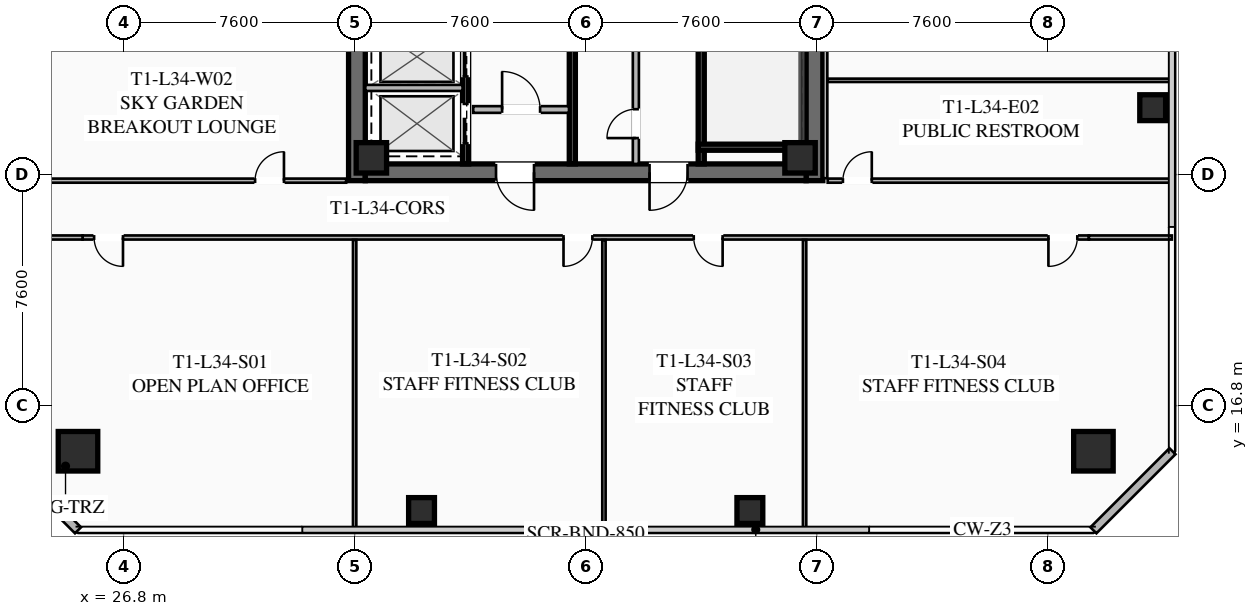
"""IFC4 building model, lengths in metres.
Left out: names, types, materials, properties, quantities, classifications, styles, units other than length and angle.
Written with IfcOpenShell. Run it as: python <this file> out.ifc"""

import sys

from ifc_helpers import new_model, si_unit, direction, frame, frame_2d, origin, origin_2d, place, context, subcontext, project, spatial, rectangle, hollow_rectangle, extrude, element, fill, save


model = new_model("IFC4")
c1 = context("Model", 3, precision=1e-05, world=origin(), true_north=direction((0.0, 1.0)))
c2 = subcontext(c1, "Body", "Model", "MODEL_VIEW")
j1 = project(units=[si_unit("LENGTHUNIT", "METRE"), si_unit("PLANEANGLEUNIT", "RADIAN")], contexts=[c1])
p1 = place(None, origin())
s1 = spatial("IfcSite", under=j1, at=p1, CompositionType="ELEMENT")
p2 = place(p1, origin())
s2 = spatial("IfcBuilding", under=s1, at=p2, CompositionType="ELEMENT")
p3 = place(p2, frame((0.0, 0.0, 128.6)))
s3 = spatial("IfcBuildingStorey", under=s2, at=p3, CompositionType="ELEMENT", Elevation=128.6)
for number, where, z_axis, x_axis in (
    (1, (34.475, 24.2, 0.0), (0.0, 0.0, 1.0), (0.0, 1.0, 0.0)),
    (2, (49.525, 39.8, 0.0), (0.0, 0.0, 1.0), (0.0, -1.0, 0.0)),
):
    element("IfcWall", number, at=place(p3, frame(where, z_axis=z_axis, x_axis=x_axis)), inside=s3, PredefinedType="SHEAR", context=c2, shape_type="SweptSolid", body=[
        extrude(rectangle(XDim=15.6, YDim=0.55, at=frame_2d((7.8, 0.0))), origin(), (0.0, 0.0, 1.0), 3.55),
    ])
p4 = place(p3, frame((49.25, 24.475, 0.0), z_axis=(0.0, 0.0, 1.0), x_axis=(-1.0, 0.0, 0.0)))
e3 = element("IfcWall", 3, at=p4, inside=s3, PredefinedType="SHEAR", context=c2, shape_type="SweptSolid", body=[
    extrude(rectangle(XDim=14.5, YDim=0.55, at=frame_2d((7.25, 0.0))), origin(), (0.0, 0.0, 1.0), 3.55),
])
p5 = place(p4, frame((8.95, 0.0, 0.0)))
e4 = element("IfcOpeningElement", 4, at=p5, cuts=e3, PredefinedType="OPENING", context=c2, shape_type="SweptSolid", body=[
    extrude(rectangle(XDim=1.25, YDim=2.25, at=frame_2d((0.625, 1.125))), frame((0.0, 0.285, 0.0), z_axis=(0.0, -1.0, 0.0), x_axis=(1.0, 0.0, 0.0)), (0.0, 0.0, 1.0), 0.57),
])
p6 = place(p4, frame((3.9, 0.0, 0.0)))
e5 = element("IfcOpeningElement", 5, at=p6, cuts=e3, PredefinedType="OPENING", context=c2, shape_type="SweptSolid", body=[
    extrude(rectangle(XDim=1.25, YDim=2.25, at=frame_2d((0.625, 1.125))), frame((0.0, 0.285, 0.0), z_axis=(0.0, -1.0, 0.0), x_axis=(1.0, 0.0, 0.0)), (0.0, 0.0, 1.0), 0.57),
])
for number, where, z_axis, x_axis in (
    (6, (34.95, 24.95, 0.0), (0.0, 0.0, 1.0), (1.0, 0.0, 0.0)),
    (7, (49.05, 24.95, 0.0), (0.0, 0.0, 1.0), (1.0, 0.0, 0.0)),
):
    element("IfcColumn", number, at=place(p3, frame(where, z_axis=z_axis, x_axis=x_axis)), inside=s3, PredefinedType="COLUMN", context=c2, shape_type="SweptSolid", body=[
        extrude(hollow_rectangle(XDim=1.0, YDim=1.0, WallThickness=0.04, at=origin_2d()), origin(), (0.0, 0.0, 1.0), 3.37),
    ])
for number, where, z_axis, x_axis in (
    (8, (25.3, 15.3, 0.0), (0.0, 0.0, 1.0), (1.0, 0.0, 0.0)),
    (9, (58.7, 15.3, 0.0), (0.0, 0.0, 1.0), (1.0, 0.0, 0.0)),
):
    element("IfcColumn", number, at=place(p3, frame(where, z_axis=z_axis, x_axis=x_axis)), inside=s3, PredefinedType="COLUMN", context=c2, shape_type="SweptSolid", body=[
        extrude(hollow_rectangle(XDim=1.3, YDim=1.3, WallThickness=0.05, at=origin_2d()), origin(), (0.0, 0.0, 1.0), 3.37),
    ])
for number, where, z_axis, x_axis in (
    (10, (36.6, 13.35, 0.0), (0.0, 0.0, 1.0), (1.0, 0.0, 0.0)),
    (11, (47.4, 13.35, 0.0), (0.0, 0.0, 1.0), (1.0, 0.0, 0.0)),
    (12, (60.65, 26.6, 0.0), (0.0, 0.0, 1.0), (1.0, 0.0, 0.0)),
):
    element("IfcColumn", number, at=place(p3, frame(where, z_axis=z_axis, x_axis=x_axis)), inside=s3, PredefinedType="COLUMN", context=c2, shape_type="SweptSolid", body=[
        extrude(hollow_rectangle(XDim=0.85, YDim=0.85, WallThickness=0.035, at=origin_2d()), origin(), (0.0, 0.0, 1.0), 3.37),
    ])
for number, where, z_axis, x_axis in (
    (13, (25.3, 12.7, 0.0), (0.0, 0.0, 1.0), (-0.707, 0.707, 0.0)),
    (14, (61.3, 15.3, 0.0), (0.0, 0.0, 1.0), (-0.707, -0.707, 0.0)),
):
    element("IfcWall", number, at=place(p3, frame(where, z_axis=z_axis, x_axis=x_axis)), inside=s3, PredefinedType="SOLIDWALL", context=c2, shape_type="SweptSolid", body=[
        extrude(rectangle(XDim=3.677, YDim=0.28, at=frame_2d((1.838, 0.0))), origin(), (0.0, 0.0, 1.0), 3.37),
    ])
p7 = place(p3, frame((45.8, 32.8, 0.0), z_axis=(0.0, 0.0, 1.0), x_axis=(0.0, -1.0, 0.0)))
e15 = element("IfcWall", 15, at=p7, inside=s3, PredefinedType="SHEAR", context=c2, shape_type="SweptSolid", body=[
    extrude(rectangle(XDim=8.05, YDim=0.2, at=frame_2d((4.025, 0.0))), origin(), (0.0, 0.0, 1.0), 3.37),
])
p8 = place(p7, frame((0.45, 0.0, 0.0)))
e16 = element("IfcOpeningElement", 16, at=p8, cuts=e15, PredefinedType="OPENING", context=c2, shape_type="SweptSolid", body=[
    extrude(rectangle(XDim=1.15, YDim=2.2, at=frame_2d((0.575, 1.1))), frame((0.0, 0.11, 0.0), z_axis=(0.0, -1.0, 0.0), x_axis=(1.0, 0.0, 0.0)), (0.0, 0.0, 1.0), 0.22),
])
p9 = place(p3, frame((45.7, 25.3, 0.0), z_axis=(0.0, 0.0, 1.0), x_axis=(1.0, 0.0, 0.0)))
e17 = element("IfcWall", 17, at=p9, inside=s3, PredefinedType="SHEAR", context=c2, shape_type="SweptSolid", body=[
    extrude(rectangle(XDim=3.55, YDim=0.2, at=frame_2d((1.775, 0.0))), origin(), (0.0, 0.0, 1.0), 3.37),
])
p10 = place(p3, frame((41.56, 24.75, 0.0), z_axis=(0.0, 0.0, 1.0), x_axis=(0.0, 1.0, 0.0)))
e18 = element("IfcWall", 18, at=p10, inside=s3, PredefinedType="SHEAR", context=c2, shape_type="SweptSolid", body=[
    extrude(rectangle(XDim=14.5, YDim=0.2, at=frame_2d((7.25, 0.0))), origin(), (0.0, 0.0, 1.0), 3.37),
])
p11 = place(p3, frame((38.3, 26.54, 0.0), z_axis=(0.0, 0.0, 1.0), x_axis=(1.0, 0.0, 0.0)))
e19 = element("IfcWall", 19, at=p11, inside=s3, PredefinedType="SOLIDWALL", context=c2, shape_type="SweptSolid", body=[
    extrude(rectangle(XDim=3.15, YDim=0.22, at=frame_2d((1.575, 0.0))), origin(), (0.0, 0.0, 1.0), 2.723),
])
p12 = place(p11, frame((0.95, 0.0, 0.0)))
e20 = element("IfcOpeningElement", 20, at=p12, cuts=e19, PredefinedType="OPENING", context=c2, shape_type="SweptSolid", body=[
    extrude(rectangle(XDim=1.25, YDim=2.25, at=frame_2d((0.625, 1.125))), frame((0.0, 0.12, 0.0), z_axis=(0.0, -1.0, 0.0), x_axis=(1.0, 0.0, 0.0)), (0.0, 0.0, 1.0), 0.24),
])
p13 = place(p3, frame((38.05, 24.75, 0.0), z_axis=(0.0, 0.0, 1.0), x_axis=(0.0, 1.0, 0.0)))
e21 = element("IfcWall", 21, at=p13, inside=s3, PredefinedType="SHEAR", context=c2, shape_type="SweptSolid", body=[
    extrude(rectangle(XDim=6.45, YDim=0.2, at=frame_2d((3.225, 0.0))), origin(), (0.0, 0.0, 1.0), 3.37),
])
p14 = place(p13, frame((4.875, 0.0, 0.0)))
e22 = element("IfcOpeningElement", 22, at=p14, cuts=e21, PredefinedType="OPENING", context=c2, shape_type="SweptSolid", body=[
    extrude(rectangle(XDim=1.3, YDim=2.25, at=frame_2d((0.65, 1.125))), frame((0.0, 0.11, 0.0), z_axis=(0.0, -1.0, 0.0), x_axis=(1.0, 0.0, 0.0)), (0.0, 0.0, 1.0), 0.22),
])
p15 = place(p13, frame((2.875, 0.0, 0.0)))
e23 = element("IfcOpeningElement", 23, at=p15, cuts=e21, PredefinedType="OPENING", context=c2, shape_type="SweptSolid", body=[
    extrude(rectangle(XDim=1.3, YDim=2.25, at=frame_2d((0.65, 1.125))), frame((0.0, 0.11, 0.0), z_axis=(0.0, -1.0, 0.0), x_axis=(1.0, 0.0, 0.0)), (0.0, 0.0, 1.0), 0.22),
])
p16 = place(p13, frame((0.675, 0.0, 0.0)))
e24 = element("IfcOpeningElement", 24, at=p16, cuts=e21, PredefinedType="OPENING", context=c2, shape_type="SweptSolid", body=[
    extrude(rectangle(XDim=1.3, YDim=2.25, at=frame_2d((0.65, 1.125))), frame((0.0, 0.11, 0.0), z_axis=(0.0, -1.0, 0.0), x_axis=(1.0, 0.0, 0.0)), (0.0, 0.0, 1.0), 0.22),
])
p17 = place(p3, frame((34.75, 27.25, 0.0), z_axis=(0.0, 0.0, 1.0), x_axis=(1.0, 0.0, 0.0)))
e25 = element("IfcWall", 25, at=p17, inside=s3, PredefinedType="SOLIDWALL", context=c2, shape_type="SweptSolid", body=[
    extrude(rectangle(XDim=3.2, YDim=0.2, at=frame_2d((1.6, 0.0))), origin(), (0.0, 0.0, 1.0), 3.37),
])
p18 = place(p3, frame((43.65, 24.75, 0.0), z_axis=(0.0, 0.0, 1.0), x_axis=(0.0, 1.0, 0.0)))
e26 = element("IfcWall", 26, at=p18, inside=s3, PredefinedType="SOLIDWALL", context=c2, shape_type="SweptSolid", body=[
    extrude(rectangle(XDim=6.9, YDim=0.2, at=frame_2d((3.45, 0.0))), origin(), (0.0, 0.0, 1.0), 2.723),
])
p19 = place(p18, frame((0.85, 0.0, 0.0)))
e27 = element("IfcOpeningElement", 27, at=p19, cuts=e26, PredefinedType="OPENING", context=c2, shape_type="SweptSolid", body=[
    extrude(rectangle(XDim=0.95, YDim=2.05, at=frame_2d((0.475, 1.025))), frame((0.0, 0.11, 0.0), z_axis=(0.0, -1.0, 0.0), x_axis=(1.0, 0.0, 0.0)), (0.0, 0.0, 1.0), 0.22),
])
p20 = place(p18, frame((4.8, 0.0, 0.0)))
e28 = element("IfcOpeningElement", 28, at=p20, cuts=e26, PredefinedType="OPENING", context=c2, shape_type="SweptSolid", body=[
    extrude(rectangle(XDim=1.05, YDim=2.2, at=frame_2d((0.525, 1.1))), frame((0.0, 0.11, 0.0), z_axis=(0.0, -1.0, 0.0), x_axis=(1.0, 0.0, 0.0)), (0.0, 0.0, 1.0), 0.22),
])
p21 = place(p3, frame((58.55, 22.33, 0.0), z_axis=(0.0, 0.0, 1.0), x_axis=(-1.0, 0.0, 0.0)))
e29 = element("IfcWall", 29, at=p21, inside=s3, PredefinedType="PARTITIONING", context=c2, shape_type="SweptSolid", body=[
    extrude(rectangle(XDim=33.1, YDim=0.135, at=frame_2d((16.55, 0.0))), origin(), (0.0, 0.0, 1.0), 2.723),
])
p22 = place(p21, frame((31.77, 0.0, 0.0)))
e30 = element("IfcOpeningElement", 30, at=p22, cuts=e29, PredefinedType="OPENING", context=c2, shape_type="SweptSolid", body=[
    extrude(rectangle(XDim=0.95, YDim=2.05, at=frame_2d((0.475, 1.025))), frame((0.0, 0.077, 0.0), z_axis=(0.0, -1.0, 0.0), x_axis=(1.0, 0.0, 0.0)), (0.0, 0.0, 1.0), 0.155),
])
p23 = place(p21, frame((16.33, 0.0, 0.0)))
e31 = element("IfcOpeningElement", 31, at=p23, cuts=e29, PredefinedType="OPENING", context=c2, shape_type="SweptSolid", body=[
    extrude(rectangle(XDim=0.95, YDim=2.05, at=frame_2d((0.475, 1.025))), frame((0.0, 0.077, 0.0), z_axis=(0.0, -1.0, 0.0), x_axis=(1.0, 0.0, 0.0)), (0.0, 0.0, 1.0), 0.155),
])
p24 = place(p21, frame((12.046, 0.0, 0.0)))
e32 = element("IfcOpeningElement", 32, at=p24, cuts=e29, PredefinedType="OPENING", context=c2, shape_type="SweptSolid", body=[
    extrude(rectangle(XDim=0.95, YDim=2.05, at=frame_2d((0.475, 1.025))), frame((0.0, 0.077, 0.0), z_axis=(0.0, -1.0, 0.0), x_axis=(1.0, 0.0, 0.0)), (0.0, 0.0, 1.0), 0.155),
])
p25 = place(p21, frame((0.38, 0.0, 0.0)))
e33 = element("IfcOpeningElement", 33, at=p25, cuts=e29, PredefinedType="OPENING", context=c2, shape_type="SweptSolid", body=[
    extrude(rectangle(XDim=0.95, YDim=2.05, at=frame_2d((0.475, 1.025))), frame((0.0, 0.077, 0.0), z_axis=(0.0, -1.0, 0.0), x_axis=(1.0, 0.0, 0.0)), (0.0, 0.0, 1.0), 0.155),
])
for number, where, z_axis, x_axis in (
    (34, (22.72, 22.33, 0.0), (0.0, 0.0, 1.0), (1.0, 0.0, 0.0)),
    (35, (58.55, 22.33, 0.0), (0.0, 0.0, 1.0), (1.0, 0.0, 0.0)),
):
    element("IfcWall", number, at=place(p3, frame(where, z_axis=z_axis, x_axis=x_axis)), inside=s3, PredefinedType="PARTITIONING", context=c2, shape_type="SweptSolid", body=[
        extrude(rectangle(XDim=2.73, YDim=0.135, at=frame_2d((1.365, 0.0))), origin(), (0.0, 0.0, 1.0), 2.723),
    ])
for number, where, z_axis, x_axis in (
    (36, (34.4, 12.72, 0.0), (0.0, 0.0, 1.0), (0.0, 1.0, 0.0)),
    (37, (42.6, 12.72, 0.0), (0.0, 0.0, 1.0), (0.0, 1.0, 0.0)),
    (38, (49.2, 12.72, 0.0), (0.0, 0.0, 1.0), (0.0, 1.0, 0.0)),
):
    element("IfcWall", number, at=place(p3, frame(where, z_axis=z_axis, x_axis=x_axis)), inside=s3, PredefinedType="PARTITIONING", context=c2, shape_type="SweptSolid", body=[
        extrude(rectangle(XDim=9.53, YDim=0.11, at=frame_2d((4.765, 0.0))), origin(), (0.0, 0.0, 1.0), 2.723),
    ])
p26 = place(p3, frame((49.88, 39.72, 0.0), z_axis=(0.0, 0.0, 1.0), x_axis=(0.0, -1.0, 0.0)))
e39 = element("IfcWall", 39, at=p26, inside=s3, PredefinedType="PARTITIONING", context=c2, shape_type="SweptSolid", body=[
    extrude(rectangle(XDim=15.44, YDim=0.135, at=frame_2d((7.72, 0.0))), origin(), (0.0, 0.0, 1.0), 2.723),
])
p27 = place(p3, frame((49.96, 24.2, 0.0), z_axis=(0.0, 0.0, 1.0), x_axis=(1.0, 0.0, 0.0)))
e40 = element("IfcWall", 40, at=p27, inside=s3, PredefinedType="PARTITIONING", context=c2, shape_type="SweptSolid", body=[
    extrude(rectangle(XDim=11.32, YDim=0.135, at=frame_2d((5.66, 0.0))), origin(), (0.0, 0.0, 1.0), 2.723),
])
p28 = place(p27, frame((0.5, 0.0, 0.0)))
e41 = element("IfcOpeningElement", 41, at=p28, cuts=e40, PredefinedType="OPENING", context=c2, shape_type="SweptSolid", body=[
    extrude(rectangle(XDim=0.95, YDim=2.05, at=frame_2d((0.475, 1.025))), frame((0.0, 0.077, 0.0), z_axis=(0.0, -1.0, 0.0), x_axis=(1.0, 0.0, 0.0)), (0.0, 0.0, 1.0), 0.155),
])
p29 = place(p3, frame((49.96, 27.5, 0.0), z_axis=(0.0, 0.0, 1.0), x_axis=(1.0, 0.0, 0.0)))
e42 = element("IfcWall", 42, at=p29, inside=s3, PredefinedType="PARTITIONING", context=c2, shape_type="SweptSolid", body=[
    extrude(rectangle(XDim=11.32, YDim=0.11, at=frame_2d((5.66, 0.0))), origin(), (0.0, 0.0, 1.0), 2.723),
])
p30 = place(p3, frame((22.87, 24.2, 0.0), z_axis=(0.0, 0.0, 1.0), x_axis=(1.0, 0.0, 0.0)))
e43 = element("IfcWall", 43, at=p30, inside=s3, PredefinedType="PARTITIONING", context=c2, shape_type="SweptSolid", body=[
    extrude(rectangle(XDim=11.25, YDim=0.135, at=frame_2d((5.625, 0.0))), origin(), (0.0, 0.0, 1.0), 2.723),
])
p31 = place(p30, frame((8.255, 0.0, 0.0)))
e44 = element("IfcOpeningElement", 44, at=p31, cuts=e43, PredefinedType="OPENING", context=c2, shape_type="SweptSolid", body=[
    extrude(rectangle(XDim=0.95, YDim=2.05, at=frame_2d((0.475, 1.025))), frame((0.0, 0.077, 0.0), z_axis=(0.0, -1.0, 0.0), x_axis=(1.0, 0.0, 0.0)), (0.0, 0.0, 1.0), 0.155),
])
p32 = place(p5, origin())
e45 = element("IfcDoor", 45, at=p32, inside=s3, OperationType="SINGLE_SWING_LEFT", PredefinedType="DOOR", context=c2, shape_type="SweptSolid", body=[
    extrude(rectangle(XDim=1.25, YDim=2.25, at=frame_2d((0.625, 1.125))), frame((0.0, 0.025, 0.0), z_axis=(0.0, -1.0, 0.0), x_axis=(1.0, 0.0, 0.0)), (0.0, 0.0, 1.0), 0.05),
])
fill(e4, e45)
p33 = place(p6, origin())
e46 = element("IfcDoor", 46, at=p33, inside=s3, OperationType="SINGLE_SWING_RIGHT", PredefinedType="DOOR", context=c2, shape_type="SweptSolid", body=[
    extrude(rectangle(XDim=1.25, YDim=2.25, at=frame_2d((0.625, 1.125))), frame((0.0, 0.025, 0.0), z_axis=(0.0, -1.0, 0.0), x_axis=(1.0, 0.0, 0.0)), (0.0, 0.0, 1.0), 0.05),
])
fill(e5, e46)
p34 = place(p12, origin())
e47 = element("IfcDoor", 47, at=p34, inside=s3, OperationType="SINGLE_SWING_LEFT", PredefinedType="DOOR", context=c2, shape_type="SweptSolid", body=[
    extrude(rectangle(XDim=1.25, YDim=2.25, at=frame_2d((0.625, 1.125))), frame((0.0, 0.025, 0.0), z_axis=(0.0, -1.0, 0.0), x_axis=(1.0, 0.0, 0.0)), (0.0, 0.0, 1.0), 0.05),
])
fill(e20, e47)
p35 = place(p19, origin())
e48 = element("IfcDoor", 48, at=p35, inside=s3, OperationType="SINGLE_SWING_LEFT", PredefinedType="DOOR", context=c2, shape_type="SweptSolid", body=[
    extrude(rectangle(XDim=0.95, YDim=2.05, at=frame_2d((0.475, 1.025))), frame((0.0, 0.025, 0.0), z_axis=(0.0, -1.0, 0.0), x_axis=(1.0, 0.0, 0.0)), (0.0, 0.0, 1.0), 0.05),
])
fill(e27, e48)
p36 = place(p22, origin())
e49 = element("IfcDoor", 49, at=p36, inside=s3, OperationType="SINGLE_SWING_LEFT", PredefinedType="DOOR", context=c2, shape_type="SweptSolid", body=[
    extrude(rectangle(XDim=0.95, YDim=2.05, at=frame_2d((0.475, 1.025))), frame((0.0, 0.025, 0.0), z_axis=(0.0, -1.0, 0.0), x_axis=(1.0, 0.0, 0.0)), (0.0, 0.0, 1.0), 0.05),
])
fill(e30, e49)
p37 = place(p23, origin())
e50 = element("IfcDoor", 50, at=p37, inside=s3, OperationType="SINGLE_SWING_RIGHT", PredefinedType="DOOR", context=c2, shape_type="SweptSolid", body=[
    extrude(rectangle(XDim=0.95, YDim=2.05, at=frame_2d((0.475, 1.025))), frame((0.0, 0.025, 0.0), z_axis=(0.0, -1.0, 0.0), x_axis=(1.0, 0.0, 0.0)), (0.0, 0.0, 1.0), 0.05),
])
fill(e31, e50)
p38 = place(p24, origin())
e51 = element("IfcDoor", 51, at=p38, inside=s3, OperationType="SINGLE_SWING_LEFT", PredefinedType="DOOR", context=c2, shape_type="SweptSolid", body=[
    extrude(rectangle(XDim=0.95, YDim=2.05, at=frame_2d((0.475, 1.025))), frame((0.0, 0.025, 0.0), z_axis=(0.0, -1.0, 0.0), x_axis=(1.0, 0.0, 0.0)), (0.0, 0.0, 1.0), 0.05),
])
fill(e32, e51)
p39 = place(p25, origin())
e52 = element("IfcDoor", 52, at=p39, inside=s3, OperationType="SINGLE_SWING_RIGHT", PredefinedType="DOOR", context=c2, shape_type="SweptSolid", body=[
    extrude(rectangle(XDim=0.95, YDim=2.05, at=frame_2d((0.475, 1.025))), frame((0.0, 0.025, 0.0), z_axis=(0.0, -1.0, 0.0), x_axis=(1.0, 0.0, 0.0)), (0.0, 0.0, 1.0), 0.05),
])
fill(e33, e52)
p40 = place(p28, origin())
e53 = element("IfcDoor", 53, at=p40, inside=s3, OperationType="SINGLE_SWING_RIGHT", PredefinedType="DOOR", context=c2, shape_type="SweptSolid", body=[
    extrude(rectangle(XDim=0.95, YDim=2.05, at=frame_2d((0.475, 1.025))), frame((0.0, 0.025, 0.0), z_axis=(0.0, -1.0, 0.0), x_axis=(1.0, 0.0, 0.0)), (0.0, 0.0, 1.0), 0.05),
])
fill(e41, e53)
p41 = place(p31, origin())
e54 = element("IfcDoor", 54, at=p41, inside=s3, OperationType="SINGLE_SWING_RIGHT", PredefinedType="DOOR", context=c2, shape_type="SweptSolid", body=[
    extrude(rectangle(XDim=0.95, YDim=2.05, at=frame_2d((0.475, 1.025))), frame((0.0, 0.025, 0.0), z_axis=(0.0, -1.0, 0.0), x_axis=(1.0, 0.0, 0.0)), (0.0, 0.0, 1.0), 0.05),
])
fill(e44, e54)
p42 = place(p15, origin())
e55 = element("IfcDoor", 55, at=p42, inside=s3, OperationType="SLIDING_TO_LEFT", PredefinedType="DOOR", context=c2, shape_type="SweptSolid", body=[
    extrude(rectangle(XDim=1.3, YDim=2.25, at=frame_2d((0.65, 1.125))), frame((0.0, 0.025, 0.0), z_axis=(0.0, -1.0, 0.0), x_axis=(1.0, 0.0, 0.0)), (0.0, 0.0, 1.0), 0.05),
])
fill(e23, e55)
p43 = place(p16, origin())
e56 = element("IfcDoor", 56, at=p43, inside=s3, OperationType="SLIDING_TO_LEFT", PredefinedType="DOOR", context=c2, shape_type="SweptSolid", body=[
    extrude(rectangle(XDim=1.3, YDim=2.25, at=frame_2d((0.65, 1.125))), frame((0.0, 0.025, 0.0), z_axis=(0.0, -1.0, 0.0), x_axis=(1.0, 0.0, 0.0)), (0.0, 0.0, 1.0), 0.05),
])
fill(e24, e56)
save(model, sys.argv[1])
